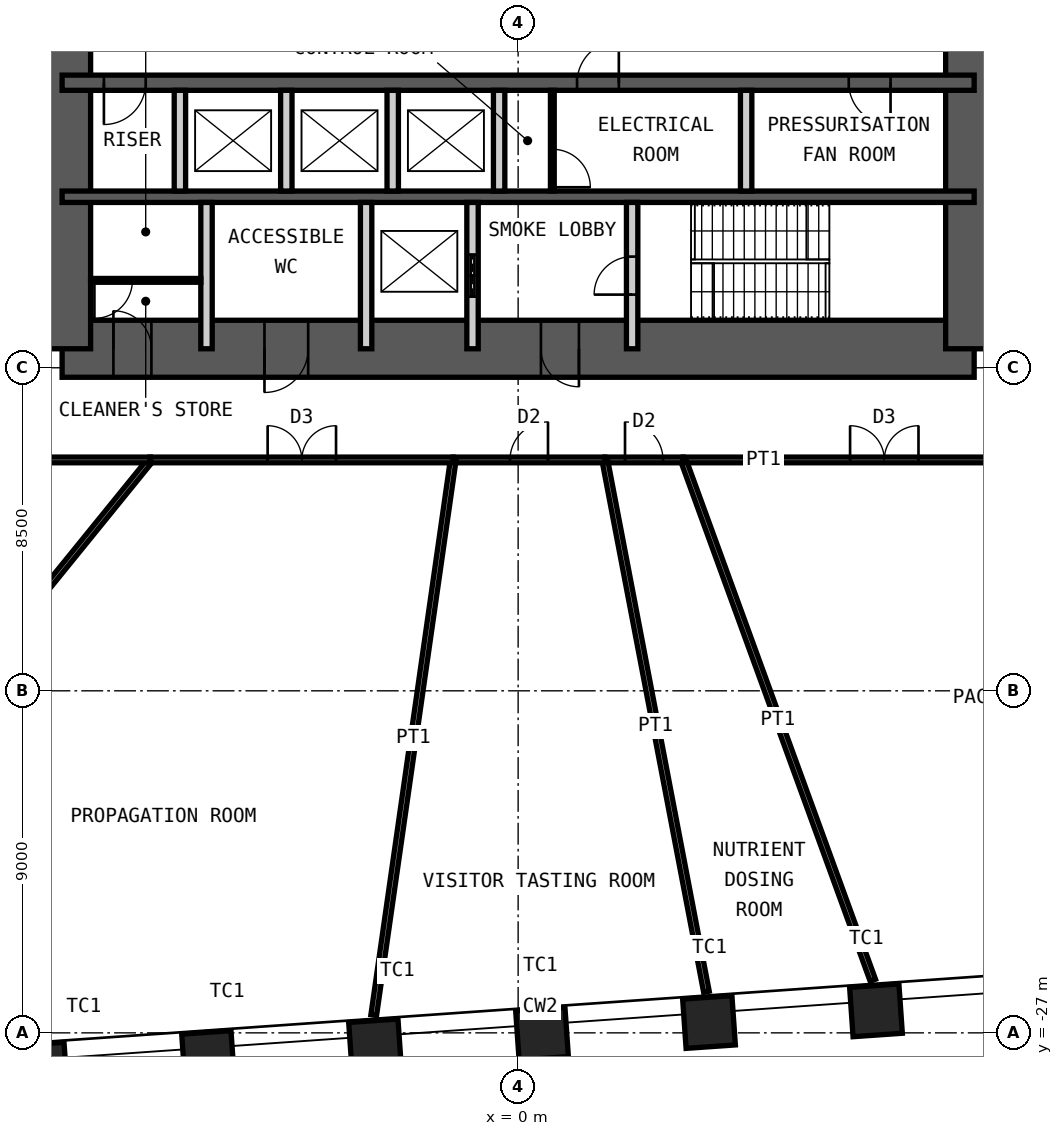
"""IFC4 building model, lengths in metres.
Left out: names, types, materials, properties, quantities, classifications, styles, units other than length and angle.
Written with IfcOpenShell. Run it as: python <this file> out.ifc"""

import sys

from ifc_helpers import new_model, si_unit, direction, frame, frame_2d, origin, origin_2d, place, context, subcontext, project, spatial, rectangle, hollow_rectangle, extrude, element, fill, save


model = new_model("IFC4")
c1 = context("Model", 3, precision=1e-05, world=origin(), true_north=direction((0.0, 1.0)))
c2 = subcontext(c1, "Body", "Model", "MODEL_VIEW")
j1 = project(units=[si_unit("LENGTHUNIT", "METRE"), si_unit("PLANEANGLEUNIT", "RADIAN")], contexts=[c1])
p1 = place(None, origin())
s1 = spatial("IfcSite", under=j1, at=p1, CompositionType="ELEMENT")
p2 = place(p1, origin())
s2 = spatial("IfcBuilding", under=s1, at=p2, CompositionType="ELEMENT")
p3 = place(p2, frame((0.0, 0.0, 22.0)))
s3 = spatial("IfcBuildingStorey", under=s2, at=p3, CompositionType="ELEMENT", Elevation=22.0)
for number, where, z_axis, x_axis in (
    (1, (9.417, -26.407, 0.0), (0.0, 0.0, 1.0), (0.998, 0.07, 0.0)),
    (2, (5.023, -26.715, 0.0), (0.0, 0.0, 1.0), (0.998, 0.07, 0.0)),
    (3, (0.629, -27.022, 0.0), (0.0, 0.0, 1.0), (0.998, 0.07, 0.0)),
    (4, (-3.765, -27.329, 0.0), (0.0, 0.0, 1.0), (0.998, 0.07, 0.0)),
    (5, (-8.159, -27.636, 0.0), (0.0, 0.0, 1.0), (0.998, 0.07, 0.0)),
    (6, (-12.553, -27.944, 0.0), (0.0, 0.0, 1.0), (0.998, 0.07, 0.0)),
):
    element("IfcColumn", number, at=place(p3, frame(where, z_axis=z_axis, x_axis=x_axis)), inside=s3, PredefinedType="COLUMN", context=c2, shape_type="SweptSolid", body=[
        extrude(hollow_rectangle(XDim=1.3, YDim=1.3, WallThickness=0.1, at=origin_2d()), origin(), (0.0, 0.0, 1.0), 5.0),
    ])
p4 = place(p3, frame((-12.0, -9.0, 0.0), z_axis=(0.0, 0.0, 1.0), x_axis=(1.0, 0.0, 0.0)))
e7 = element("IfcWall", 7, at=p4, inside=s3, PredefinedType="SHEAR", context=c2, shape_type="SweptSolid", body=[
    extrude(rectangle(XDim=24.0, YDim=1.5, at=frame_2d((12.0, 0.0))), origin(), (0.0, 0.0, 1.0), 5.0),
])
p5 = place(p4, frame((1.35, 0.0, 0.0)))
e8 = element("IfcOpeningElement", 8, at=p5, cuts=e7, PredefinedType="OPENING", context=c2, shape_type="SweptSolid", body=[
    extrude(rectangle(XDim=1.0, YDim=2.1, at=frame_2d((0.5, 1.05))), frame((0.0, 0.76, 0.0), z_axis=(0.0, -1.0, 0.0), x_axis=(1.0, 0.0, 0.0)), (0.0, 0.0, 1.0), 1.52),
])
p6 = place(p4, frame((5.325, 0.0, 0.0)))
e9 = element("IfcOpeningElement", 9, at=p6, cuts=e7, PredefinedType="OPENING", context=c2, shape_type="SweptSolid", body=[
    extrude(rectangle(XDim=1.15, YDim=2.1, at=frame_2d((0.575, 1.05))), frame((0.0, 0.76, 0.0), z_axis=(0.0, -1.0, 0.0), x_axis=(1.0, 0.0, 0.0)), (0.0, 0.0, 1.0), 1.52),
])
p7 = place(p4, frame((12.6, 0.0, 0.0)))
e10 = element("IfcOpeningElement", 10, at=p7, cuts=e7, PredefinedType="OPENING", context=c2, shape_type="SweptSolid", body=[
    extrude(rectangle(XDim=1.0, YDim=2.1, at=frame_2d((0.5, 1.05))), frame((0.0, 0.76, 0.0), z_axis=(0.0, -1.0, 0.0), x_axis=(1.0, 0.0, 0.0)), (0.0, 0.0, 1.0), 1.52),
])
p8 = place(p3, frame((12.0, -9.0, 0.0), z_axis=(0.0, 0.0, 1.0), x_axis=(0.0, 1.0, 0.0)))
e11 = element("IfcWall", 11, at=p8, inside=s3, PredefinedType="SHEAR", context=c2, shape_type="SweptSolid", body=[
    extrude(rectangle(XDim=18.0, YDim=1.5, at=frame_2d((9.0, 0.0))), origin(), (0.0, 0.0, 1.0), 5.0),
])
p9 = place(p8, frame((8.1, 0.0, 0.0)))
e12 = element("IfcOpeningElement", 12, at=p9, cuts=e11, PredefinedType="OPENING", context=c2, shape_type="SweptSolid", body=[
    extrude(rectangle(XDim=1.8, YDim=2.1, at=frame_2d((0.9, 1.05))), frame((0.0, 0.76, 0.0), z_axis=(0.0, -1.0, 0.0), x_axis=(1.0, 0.0, 0.0)), (0.0, 0.0, 1.0), 1.52),
])
p10 = place(p3, frame((-12.0, -9.0, 0.0), z_axis=(0.0, 0.0, 1.0), x_axis=(0.0, 1.0, 0.0)))
e13 = element("IfcWall", 13, at=p10, inside=s3, PredefinedType="SHEAR", context=c2, shape_type="SweptSolid", body=[
    extrude(rectangle(XDim=18.0, YDim=1.5, at=frame_2d((9.0, 0.0))), origin(), (0.0, 0.0, 1.0), 5.0),
])
p11 = place(p10, frame((8.1, 0.0, 0.0)))
e14 = element("IfcOpeningElement", 14, at=p11, cuts=e13, PredefinedType="OPENING", context=c2, shape_type="SweptSolid", body=[
    extrude(rectangle(XDim=1.8, YDim=2.1, at=frame_2d((0.9, 1.05))), frame((0.0, 0.76, 0.0), z_axis=(0.0, -1.0, 0.0), x_axis=(1.0, 0.0, 0.0)), (0.0, 0.0, 1.0), 1.52),
])
p12 = place(p3, frame((-12.0, -2.0, 0.0), z_axis=(0.0, 0.0, 1.0), x_axis=(1.0, 0.0, 0.0)))
e15 = element("IfcWall", 15, at=p12, inside=s3, PredefinedType="SHEAR", context=c2, shape_type="SweptSolid", body=[
    extrude(rectangle(XDim=24.0, YDim=0.4, at=frame_2d((12.0, 0.0))), origin(), (0.0, 0.0, 1.0), 5.0),
])
p13 = place(p12, frame((1.1, 0.0, 0.0)))
e16 = element("IfcOpeningElement", 16, at=p13, cuts=e15, PredefinedType="OPENING", context=c2, shape_type="SweptSolid", body=[
    extrude(rectangle(XDim=1.1, YDim=2.1, at=frame_2d((0.55, 1.05))), frame((0.0, 0.21, 0.0), z_axis=(0.0, -1.0, 0.0), x_axis=(1.0, 0.0, 0.0)), (0.0, 0.0, 1.0), 0.42),
])
p14 = place(p12, frame((13.55, 0.0, 0.0)))
e17 = element("IfcOpeningElement", 17, at=p14, cuts=e15, PredefinedType="OPENING", context=c2, shape_type="SweptSolid", body=[
    extrude(rectangle(XDim=1.1, YDim=2.1, at=frame_2d((0.55, 1.05))), frame((0.0, 0.21, 0.0), z_axis=(0.0, -1.0, 0.0), x_axis=(1.0, 0.0, 0.0)), (0.0, 0.0, 1.0), 0.42),
])
p15 = place(p12, frame((20.7, 0.0, 0.0)))
e18 = element("IfcOpeningElement", 18, at=p15, cuts=e15, PredefinedType="OPENING", context=c2, shape_type="SweptSolid", body=[
    extrude(rectangle(XDim=1.1, YDim=2.1, at=frame_2d((0.55, 1.05))), frame((0.0, 0.21, 0.0), z_axis=(0.0, -1.0, 0.0), x_axis=(1.0, 0.0, 0.0)), (0.0, 0.0, 1.0), 0.42),
])
p16 = place(p3, frame((-12.0, -5.0, 0.0), z_axis=(0.0, 0.0, 1.0), x_axis=(1.0, 0.0, 0.0)))
e19 = element("IfcWall", 19, at=p16, inside=s3, PredefinedType="SHEAR", context=c2, shape_type="SweptSolid", body=[
    extrude(rectangle(XDim=24.0, YDim=0.3, at=frame_2d((12.0, 0.0))), origin(), (0.0, 0.0, 1.0), 5.0),
])
for number, where, z_axis, x_axis in (
    (20, (-8.9, -4.85, 0.0), (0.0, 0.0, 1.0), (0.0, 1.0, 0.0)),
    (21, (-6.1, -4.85, 0.0), (0.0, 0.0, 1.0), (0.0, 1.0, 0.0)),
    (22, (-3.3, -4.85, 0.0), (0.0, 0.0, 1.0), (0.0, 1.0, 0.0)),
    (23, (-0.5, -4.85, 0.0), (0.0, 0.0, 1.0), (0.0, 1.0, 0.0)),
    (24, (6.0, -4.85, 0.0), (0.0, 0.0, 1.0), (0.0, 1.0, 0.0)),
):
    element("IfcWall", number, at=place(p3, frame(where, z_axis=z_axis, x_axis=x_axis)), inside=s3, PredefinedType="PARTITIONING", context=c2, shape_type="SweptSolid", body=[
        extrude(rectangle(XDim=2.65, YDim=0.3, at=frame_2d((1.325, 0.0))), origin(), (0.0, 0.0, 1.0), 4.78),
    ])
for number, where, z_axis, x_axis in (
    (25, (-8.2, -9.0, 0.0), (0.0, 0.0, 1.0), (0.0, 1.0, 0.0)),
    (26, (-4.0, -9.0, 0.0), (0.0, 0.0, 1.0), (0.0, 1.0, 0.0)),
):
    element("IfcWall", number, at=place(p3, frame(where, z_axis=z_axis, x_axis=x_axis)), inside=s3, PredefinedType="PARTITIONING", context=c2, shape_type="SweptSolid", body=[
        extrude(rectangle(XDim=3.85, YDim=0.3, at=frame_2d((1.925, 0.0))), origin(), (0.0, 0.0, 1.0), 4.78),
    ])
p17 = place(p3, frame((-1.2, -9.0, 0.0), z_axis=(0.0, 0.0, 1.0), x_axis=(0.0, 1.0, 0.0)))
e27 = element("IfcWall", 27, at=p17, inside=s3, PredefinedType="PARTITIONING", context=c2, shape_type="SweptSolid", body=[
    extrude(rectangle(XDim=3.85, YDim=0.3, at=frame_2d((1.925, 0.0))), origin(), (0.0, 0.0, 1.0), 4.78),
])
p18 = place(p17, frame((1.375, 0.0, 0.0)))
e28 = element("IfcOpeningElement", 28, at=p18, cuts=e27, PredefinedType="OPENING", context=c2, shape_type="SweptSolid", body=[
    extrude(rectangle(XDim=1.1, YDim=2.4, at=frame_2d((0.55, 1.2))), frame((0.0, 0.16, 0.0), z_axis=(0.0, -1.0, 0.0), x_axis=(1.0, 0.0, 0.0)), (0.0, 0.0, 1.0), 0.32),
])
p19 = place(p3, frame((3.0, -9.0, 0.0), z_axis=(0.0, 0.0, 1.0), x_axis=(0.0, 1.0, 0.0)))
e29 = element("IfcWall", 29, at=p19, inside=s3, PredefinedType="PARTITIONING", context=c2, shape_type="SweptSolid", body=[
    extrude(rectangle(XDim=3.85, YDim=0.3, at=frame_2d((1.925, 0.0))), origin(), (0.0, 0.0, 1.0), 4.78),
])
p20 = place(p19, frame((1.425, 0.0, 0.0)))
e30 = element("IfcOpeningElement", 30, at=p20, cuts=e29, PredefinedType="OPENING", context=c2, shape_type="SweptSolid", body=[
    extrude(rectangle(XDim=1.0, YDim=2.1, at=frame_2d((0.5, 1.05))), frame((0.0, 0.16, 0.0), z_axis=(0.0, -1.0, 0.0), x_axis=(1.0, 0.0, 0.0)), (0.0, 0.0, 1.0), 0.32),
])
p21 = place(p3, frame((0.9, -4.85, 0.0), z_axis=(0.0, 0.0, 1.0), x_axis=(0.0, 1.0, 0.0)))
e31 = element("IfcWall", 31, at=p21, inside=s3, PredefinedType="PARTITIONING", context=c2, shape_type="SweptSolid", body=[
    extrude(rectangle(XDim=2.65, YDim=0.1, at=frame_2d((1.325, 0.0))), origin(), (0.0, 0.0, 1.0), 4.78),
])
p22 = place(p21, frame((0.1, 0.0, 0.0)))
e32 = element("IfcOpeningElement", 32, at=p22, cuts=e31, PredefinedType="OPENING", context=c2, shape_type="SweptSolid", body=[
    extrude(rectangle(XDim=1.0, YDim=2.4, at=frame_2d((0.5, 1.2))), frame((0.0, 0.06, 0.0), z_axis=(0.0, -1.0, 0.0), x_axis=(1.0, 0.0, 0.0)), (0.0, 0.0, 1.0), 0.12),
])
p23 = place(p3, frame((-11.25, -7.2, 0.0), z_axis=(0.0, 0.0, 1.0), x_axis=(1.0, 0.0, 0.0)))
e33 = element("IfcWall", 33, at=p23, inside=s3, PredefinedType="PARTITIONING", context=c2, shape_type="SweptSolid", body=[
    extrude(rectangle(XDim=2.9, YDim=0.1, at=frame_2d((1.45, 0.0))), origin(), (0.0, 0.0, 1.0), 4.78),
])
p24 = place(p23, frame((0.1, 0.0, 0.0)))
e34 = element("IfcOpeningElement", 34, at=p24, cuts=e33, PredefinedType="OPENING", context=c2, shape_type="SweptSolid", body=[
    extrude(rectangle(XDim=1.0, YDim=2.4, at=frame_2d((0.5, 1.2))), frame((0.0, 0.06, 0.0), z_axis=(0.0, -1.0, 0.0), x_axis=(1.0, 0.0, 0.0)), (0.0, 0.0, 1.0), 0.12),
])
p25 = place(p3, frame((-17.68, -21.791, 0.0), z_axis=(0.0, 0.0, 1.0), x_axis=(0.630056381531, 0.776549390633, 0.0)))
e35 = element("IfcWall", 35, at=p25, inside=s3, PredefinedType="PARTITIONING", context=c2, shape_type="SweptSolid", body=[
    extrude(rectangle(XDim=12.704, YDim=0.15, at=frame_2d((6.352, 0.0))), origin(), (0.0, 0.0, 1.0), 3.7),
])
p26 = place(p3, frame((-9.676, -11.925, 0.0), z_axis=(0.0, 0.0, 1.0), x_axis=(-1.0, 0.0, 0.0)))
e36 = element("IfcWall", 36, at=p26, inside=s3, PredefinedType="PARTITIONING", context=c2, shape_type="SweptSolid", body=[
    extrude(rectangle(XDim=5.25, YDim=0.15, at=frame_2d((2.625, 0.0))), origin(), (0.0, 0.0, 1.0), 4.8),
])
p27 = place(p3, frame((14.925, -11.925, 0.0), z_axis=(0.0, 0.0, 1.0), x_axis=(-1.0, 0.0, 0.0)))
e37 = element("IfcWall", 37, at=p27, inside=s3, PredefinedType="PARTITIONING", context=c2, shape_type="SweptSolid", body=[
    extrude(rectangle(XDim=10.58, YDim=0.15, at=frame_2d((5.29, 0.0))), origin(), (0.0, 0.0, 1.0), 4.8),
])
p28 = place(p27, frame((4.39, 0.0, 0.0)))
e38 = element("IfcOpeningElement", 38, at=p28, cuts=e37, PredefinedType="OPENING", context=c2, shape_type="SweptSolid", body=[
    extrude(rectangle(XDim=1.8, YDim=2.4, at=frame_2d((0.9, 1.2))), frame((0.0, 0.085, 0.0), z_axis=(0.0, -1.0, 0.0), x_axis=(1.0, 0.0, 0.0)), (0.0, 0.0, 1.0), 0.17),
])
p29 = place(p3, frame((9.333, -25.615, 0.0), z_axis=(0.0, 0.0, 1.0), x_axis=(-0.342351086478, 0.939572101324, 0.0)))
e39 = element("IfcWall", 39, at=p29, inside=s3, PredefinedType="PARTITIONING", context=c2, shape_type="SweptSolid", body=[
    extrude(rectangle(XDim=14.571, YDim=0.15, at=frame_2d((7.285, 0.0))), origin(), (0.0, 0.0, 1.0), 3.7),
])
p30 = place(p3, frame((4.345, -11.925, 0.0), z_axis=(0.0, 0.0, 1.0), x_axis=(-1.0, 0.0, 0.0)))
e40 = element("IfcWall", 40, at=p30, inside=s3, PredefinedType="PARTITIONING", context=c2, shape_type="SweptSolid", body=[
    extrude(rectangle(XDim=2.065, YDim=0.15, at=frame_2d((1.033, 0.0))), origin(), (0.0, 0.0, 1.0), 4.8),
])
p31 = place(p30, frame((0.533, 0.0, 0.0)))
e41 = element("IfcOpeningElement", 41, at=p31, cuts=e40, PredefinedType="OPENING", context=c2, shape_type="SweptSolid", body=[
    extrude(rectangle(XDim=1.0, YDim=2.4, at=frame_2d((0.5, 1.2))), frame((0.0, 0.085, 0.0), z_axis=(0.0, -1.0, 0.0), x_axis=(1.0, 0.0, 0.0)), (0.0, 0.0, 1.0), 0.17),
])
p32 = place(p3, frame((4.955, -25.918, 0.0), z_axis=(0.0, 0.0, 1.0), x_axis=(-0.187784559803, 0.982210241801, 0.0)))
e42 = element("IfcWall", 42, at=p32, inside=s3, PredefinedType="PARTITIONING", context=c2, shape_type="SweptSolid", body=[
    extrude(rectangle(XDim=14.247, YDim=0.15, at=frame_2d((7.123, 0.0))), origin(), (0.0, 0.0, 1.0), 3.7),
])
p33 = place(p3, frame((2.28, -11.925, 0.0), z_axis=(0.0, 0.0, 1.0), x_axis=(-1.0, 0.0, 0.0)))
e43 = element("IfcWall", 43, at=p33, inside=s3, PredefinedType="PARTITIONING", context=c2, shape_type="SweptSolid", body=[
    extrude(rectangle(XDim=3.988, YDim=0.15, at=frame_2d((1.994, 0.0))), origin(), (0.0, 0.0, 1.0), 4.8),
])
p34 = place(p33, frame((1.494, 0.0, 0.0)))
e44 = element("IfcOpeningElement", 44, at=p34, cuts=e43, PredefinedType="OPENING", context=c2, shape_type="SweptSolid", body=[
    extrude(rectangle(XDim=1.0, YDim=2.4, at=frame_2d((0.5, 1.2))), frame((0.0, 0.085, 0.0), z_axis=(0.0, -1.0, 0.0), x_axis=(1.0, 0.0, 0.0)), (0.0, 0.0, 1.0), 0.17),
])
p35 = place(p3, frame((-3.8, -26.532, 0.0), z_axis=(0.0, 0.0, 1.0), x_axis=(0.141775745175, 0.989898801939, 0.0)))
e45 = element("IfcWall", 45, at=p35, inside=s3, PredefinedType="PARTITIONING", context=c2, shape_type="SweptSolid", body=[
    extrude(rectangle(XDim=14.756, YDim=0.15, at=frame_2d((7.378, 0.0))), origin(), (0.0, 0.0, 1.0), 3.7),
])
p36 = place(p3, frame((-1.708, -11.925, 0.0), z_axis=(0.0, 0.0, 1.0), x_axis=(-1.0, 0.0, 0.0)))
e46 = element("IfcWall", 46, at=p36, inside=s3, PredefinedType="PARTITIONING", context=c2, shape_type="SweptSolid", body=[
    extrude(rectangle(XDim=7.968, YDim=0.15, at=frame_2d((3.984, 0.0))), origin(), (0.0, 0.0, 1.0), 4.8),
])
p37 = place(p36, frame((3.084, 0.0, 0.0)))
e47 = element("IfcOpeningElement", 47, at=p37, cuts=e46, PredefinedType="OPENING", context=c2, shape_type="SweptSolid", body=[
    extrude(rectangle(XDim=1.8, YDim=2.4, at=frame_2d((0.9, 1.2))), frame((0.0, 0.085, 0.0), z_axis=(0.0, -1.0, 0.0), x_axis=(1.0, 0.0, 0.0)), (0.0, 0.0, 1.0), 0.17),
])
p38 = place(p5, origin())
e48 = element("IfcDoor", 48, at=p38, inside=s3, OperationType="SINGLE_SWING_RIGHT", PredefinedType="DOOR", context=c2, shape_type="SweptSolid", body=[
    extrude(rectangle(XDim=1.0, YDim=2.1, at=frame_2d((0.5, 1.05))), frame((0.0, 0.025, 0.0), z_axis=(0.0, -1.0, 0.0), x_axis=(1.0, 0.0, 0.0)), (0.0, 0.0, 1.0), 0.05),
])
fill(e8, e48)
p39 = place(p6, origin())
e49 = element("IfcDoor", 49, at=p39, inside=s3, OperationType="SINGLE_SWING_LEFT", PredefinedType="DOOR", context=c2, shape_type="SweptSolid", body=[
    extrude(rectangle(XDim=1.15, YDim=2.1, at=frame_2d((0.575, 1.05))), frame((0.0, 0.025, 0.0), z_axis=(0.0, -1.0, 0.0), x_axis=(1.0, 0.0, 0.0)), (0.0, 0.0, 1.0), 0.05),
])
fill(e9, e49)
p40 = place(p7, origin())
e50 = element("IfcDoor", 50, at=p40, inside=s3, OperationType="SINGLE_SWING_RIGHT", PredefinedType="DOOR", context=c2, shape_type="SweptSolid", body=[
    extrude(rectangle(XDim=1.0, YDim=2.1, at=frame_2d((0.5, 1.05))), frame((0.0, 0.025, 0.0), z_axis=(0.0, -1.0, 0.0), x_axis=(1.0, 0.0, 0.0)), (0.0, 0.0, 1.0), 0.05),
])
fill(e10, e50)
p41 = place(p20, origin())
e51 = element("IfcDoor", 51, at=p41, inside=s3, OperationType="SINGLE_SWING_RIGHT", PredefinedType="DOOR", context=c2, shape_type="SweptSolid", body=[
    extrude(rectangle(XDim=1.0, YDim=2.1, at=frame_2d((0.5, 1.05))), frame((0.0, 0.025, 0.0), z_axis=(0.0, -1.0, 0.0), x_axis=(1.0, 0.0, 0.0)), (0.0, 0.0, 1.0), 0.05),
])
fill(e30, e51)
p42 = place(p13, origin())
e52 = element("IfcDoor", 52, at=p42, inside=s3, OperationType="SINGLE_SWING_LEFT", PredefinedType="DOOR", context=c2, shape_type="SweptSolid", body=[
    extrude(rectangle(XDim=1.1, YDim=2.1, at=frame_2d((0.55, 1.05))), frame((0.0, 0.025, 0.0), z_axis=(0.0, -1.0, 0.0), x_axis=(1.0, 0.0, 0.0)), (0.0, 0.0, 1.0), 0.05),
])
fill(e16, e52)
p43 = place(p14, origin())
e53 = element("IfcDoor", 53, at=p43, inside=s3, OperationType="SINGLE_SWING_LEFT", PredefinedType="DOOR", context=c2, shape_type="SweptSolid", body=[
    extrude(rectangle(XDim=1.1, YDim=2.1, at=frame_2d((0.55, 1.05))), frame((0.0, 0.025, 0.0), z_axis=(0.0, -1.0, 0.0), x_axis=(1.0, 0.0, 0.0)), (0.0, 0.0, 1.0), 0.05),
])
fill(e17, e53)
p44 = place(p15, origin())
e54 = element("IfcDoor", 54, at=p44, inside=s3, OperationType="SINGLE_SWING_RIGHT", PredefinedType="DOOR", context=c2, shape_type="SweptSolid", body=[
    extrude(rectangle(XDim=1.1, YDim=2.1, at=frame_2d((0.55, 1.05))), frame((0.0, 0.025, 0.0), z_axis=(0.0, -1.0, 0.0), x_axis=(1.0, 0.0, 0.0)), (0.0, 0.0, 1.0), 0.05),
])
fill(e18, e54)
p45 = place(p18, origin())
e55 = element("IfcDoor", 55, at=p45, inside=s3, OperationType="DOUBLE_DOOR_SLIDING", PredefinedType="DOOR", context=c2, shape_type="SweptSolid", body=[
    extrude(rectangle(XDim=1.1, YDim=2.4, at=frame_2d((0.55, 1.2))), frame((0.0, 0.025, 0.0), z_axis=(0.0, -1.0, 0.0), x_axis=(1.0, 0.0, 0.0)), (0.0, 0.0, 1.0), 0.05),
])
fill(e28, e55)
p46 = place(p22, origin())
e56 = element("IfcDoor", 56, at=p46, inside=s3, OperationType="SINGLE_SWING_LEFT", PredefinedType="DOOR", context=c2, shape_type="SweptSolid", body=[
    extrude(rectangle(XDim=1.0, YDim=2.4, at=frame_2d((0.5, 1.2))), frame((0.0, 0.025, 0.0), z_axis=(0.0, -1.0, 0.0), x_axis=(1.0, 0.0, 0.0)), (0.0, 0.0, 1.0), 0.05),
])
fill(e32, e56)
p47 = place(p24, origin())
e57 = element("IfcDoor", 57, at=p47, inside=s3, OperationType="SINGLE_SWING_LEFT", PredefinedType="DOOR", context=c2, shape_type="SweptSolid", body=[
    extrude(rectangle(XDim=1.0, YDim=2.4, at=frame_2d((0.5, 1.2))), frame((0.0, 0.025, 0.0), z_axis=(0.0, -1.0, 0.0), x_axis=(1.0, 0.0, 0.0)), (0.0, 0.0, 1.0), 0.05),
])
fill(e34, e57)
p48 = place(p28, origin())
e58 = element("IfcDoor", 58, at=p48, inside=s3, OperationType="DOUBLE_DOOR_DOUBLE_SWING", PredefinedType="DOOR", context=c2, shape_type="SweptSolid", body=[
    extrude(rectangle(XDim=1.8, YDim=2.4, at=frame_2d((0.9, 1.2))), frame((0.0, 0.025, 0.0), z_axis=(0.0, -1.0, 0.0), x_axis=(1.0, 0.0, 0.0)), (0.0, 0.0, 1.0), 0.05),
])
fill(e38, e58)
p49 = place(p31, origin())
e59 = element("IfcDoor", 59, at=p49, inside=s3, OperationType="SINGLE_SWING_RIGHT", PredefinedType="DOOR", context=c2, shape_type="SweptSolid", body=[
    extrude(rectangle(XDim=1.0, YDim=2.4, at=frame_2d((0.5, 1.2))), frame((0.0, 0.025, 0.0), z_axis=(0.0, -1.0, 0.0), x_axis=(1.0, 0.0, 0.0)), (0.0, 0.0, 1.0), 0.05),
])
fill(e41, e59)
p50 = place(p34, origin())
e60 = element("IfcDoor", 60, at=p50, inside=s3, OperationType="SINGLE_SWING_LEFT", PredefinedType="DOOR", context=c2, shape_type="SweptSolid", body=[
    extrude(rectangle(XDim=1.0, YDim=2.4, at=frame_2d((0.5, 1.2))), frame((0.0, 0.025, 0.0), z_axis=(0.0, -1.0, 0.0), x_axis=(1.0, 0.0, 0.0)), (0.0, 0.0, 1.0), 0.05),
])
fill(e44, e60)
p51 = place(p37, origin())
e61 = element("IfcDoor", 61, at=p51, inside=s3, OperationType="DOUBLE_DOOR_DOUBLE_SWING", PredefinedType="DOOR", context=c2, shape_type="SweptSolid", body=[
    extrude(rectangle(XDim=1.8, YDim=2.4, at=frame_2d((0.9, 1.2))), frame((0.0, 0.025, 0.0), z_axis=(0.0, -1.0, 0.0), x_axis=(1.0, 0.0, 0.0)), (0.0, 0.0, 1.0), 0.05),
])
fill(e47, e61)
save(model, sys.argv[1])
